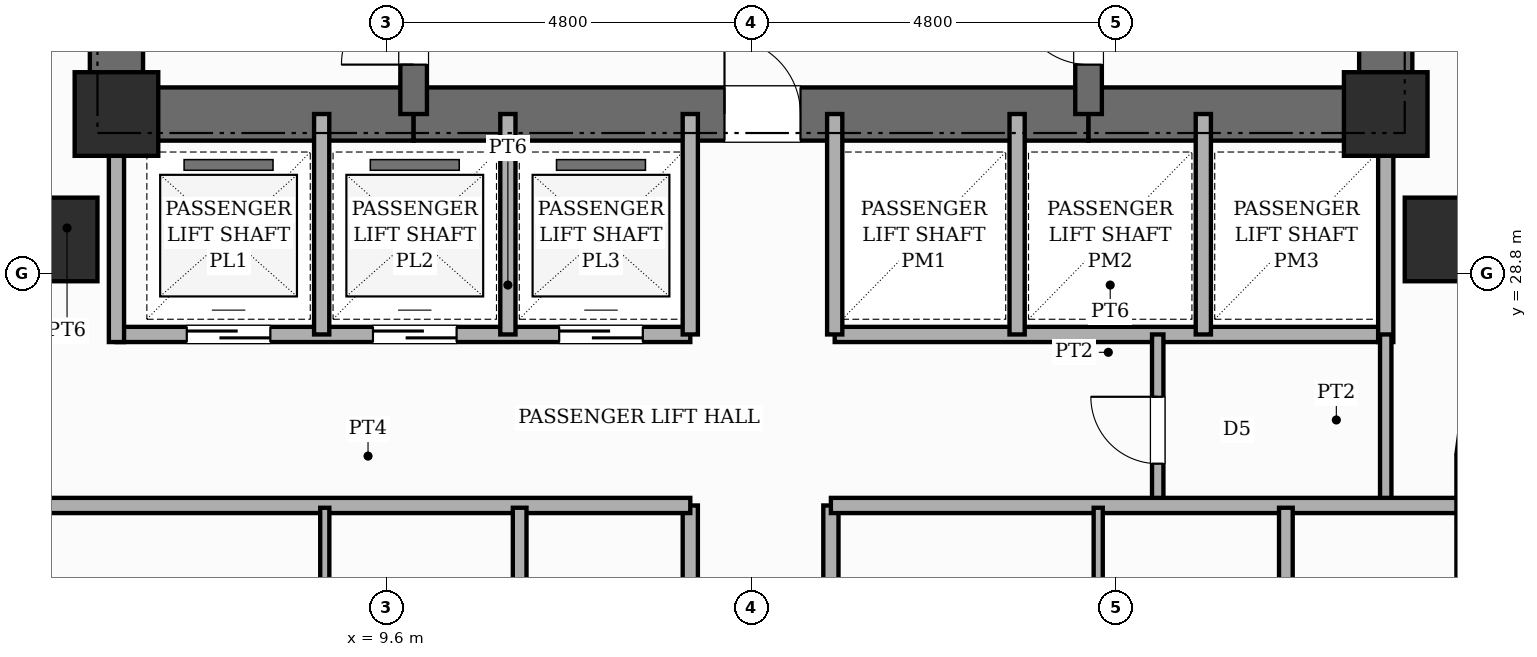
"""IFC4 building model, lengths in metres.
Left out: names, types, materials, properties, quantities, classifications, styles, units other than length and angle.
Written with IfcOpenShell. Run it as: python <this file> out.ifc"""

import sys

from ifc_helpers import new_model, si_unit, direction, frame, frame_2d, origin, origin_2d, place, context, subcontext, project, spatial, rectangle, extrude, element, fill, save


model = new_model("IFC4")
c1 = context("Model", 3, precision=1e-05, world=origin(), true_north=direction((0.0, 1.0)))
c2 = subcontext(c1, "Body", "Model", "MODEL_VIEW")
j1 = project(units=[si_unit("LENGTHUNIT", "METRE"), si_unit("PLANEANGLEUNIT", "RADIAN")], contexts=[c1])
p1 = place(None, origin())
s1 = spatial("IfcSite", under=j1, at=p1, CompositionType="ELEMENT")
p2 = place(p1, origin())
s2 = spatial("IfcBuilding", under=s1, at=p2, CompositionType="ELEMENT")
p3 = place(p2, frame((0.0, 0.0, 28.6)))
s3 = spatial("IfcBuildingStorey", under=s2, at=p3, CompositionType="ELEMENT", Elevation=28.6)
p4 = place(p3, frame((6.05, 30.55, 0.0), z_axis=(0.0, 0.0, 1.0), x_axis=(0.0, 1.0, 0.0)))
e1 = element("IfcWall", 1, at=p4, inside=s3, PredefinedType="SHEAR", context=c2, shape_type="SweptSolid", body=[
    extrude(rectangle(XDim=15.6, YDim=0.7, at=frame_2d((7.8, 0.0))), origin(), (0.0, 0.0, 1.0), 3.6),
])
p5 = place(p3, frame((22.75, 30.55, 0.0), z_axis=(0.0, 0.0, 1.0), x_axis=(0.0, 1.0, 0.0)))
e2 = element("IfcWall", 2, at=p5, inside=s3, PredefinedType="SHEAR", context=c2, shape_type="SweptSolid", body=[
    extrude(rectangle(XDim=15.6, YDim=0.7, at=frame_2d((7.8, 0.0))), origin(), (0.0, 0.0, 1.0), 3.6),
])
p6 = place(p5, frame((10.8, 0.0, 0.0)))
e3 = element("IfcOpeningElement", 3, at=p6, cuts=e2, PredefinedType="OPENING", context=c2, shape_type="SweptSolid", body=[
    extrude(rectangle(XDim=1.0, YDim=2.15, at=frame_2d((0.5, 1.075))), frame((0.0, 0.36, 0.0), z_axis=(0.0, -1.0, 0.0), x_axis=(1.0, 0.0, 0.0)), (0.0, 0.0, 1.0), 0.72),
])
p7 = place(p3, frame((6.05, 30.9, 0.0), z_axis=(0.0, 0.0, 1.0), x_axis=(1.0, 0.0, 0.0)))
e4 = element("IfcWall", 4, at=p7, inside=s3, PredefinedType="SHEAR", context=c2, shape_type="SweptSolid", body=[
    extrude(rectangle(XDim=3.91, YDim=0.7, at=frame_2d((1.955, 0.0))), origin(), (0.0, 0.0, 1.0), 3.6),
])
p8 = place(p3, frame((9.96, 30.9, 0.0), z_axis=(0.0, 0.0, 1.0), x_axis=(1.0, 0.0, 0.0)))
e5 = element("IfcWall", 5, at=p8, inside=s3, PredefinedType="SHEAR", context=c2, shape_type="SweptSolid", body=[
    extrude(rectangle(XDim=8.88, YDim=0.7, at=frame_2d((4.44, 0.0))), origin(), (0.0, 0.0, 1.0), 3.6),
])
p9 = place(p8, frame((4.09, 0.0, 0.0)))
e6 = element("IfcOpeningElement", 6, at=p9, cuts=e5, PredefinedType="OPENING", context=c2, shape_type="SweptSolid", body=[
    extrude(rectangle(XDim=1.0, YDim=2.15, at=frame_2d((0.5, 1.075))), frame((0.0, 0.36, 0.0), z_axis=(0.0, -1.0, 0.0), x_axis=(1.0, 0.0, 0.0)), (0.0, 0.0, 1.0), 0.72),
])
p10 = place(p3, frame((18.84, 30.9, 0.0), z_axis=(0.0, 0.0, 1.0), x_axis=(1.0, 0.0, 0.0)))
e7 = element("IfcWall", 7, at=p10, inside=s3, PredefinedType="SHEAR", context=c2, shape_type="SweptSolid", body=[
    extrude(rectangle(XDim=3.91, YDim=0.7, at=frame_2d((1.955, 0.0))), origin(), (0.0, 0.0, 1.0), 3.6),
])
p11 = place(p3, frame((9.96, 30.9, 0.0), z_axis=(0.0, 0.0, 1.0), x_axis=(0.0, 1.0, 0.0)))
e8 = element("IfcWall", 8, at=p11, inside=s3, PredefinedType="SHEAR", context=c2, shape_type="SweptSolid", body=[
    extrude(rectangle(XDim=14.9, YDim=0.35, at=frame_2d((7.45, 0.0))), origin(), (0.0, 0.0, 1.0), 3.6),
])
p12 = place(p11, frame((0.65, 0.0, 0.0)))
e9 = element("IfcOpeningElement", 9, at=p12, cuts=e8, PredefinedType="OPENING", context=c2, shape_type="SweptSolid", body=[
    extrude(rectangle(XDim=0.95, YDim=2.1, at=frame_2d((0.475, 1.05))), frame((0.0, 0.185, 0.0), z_axis=(0.0, -1.0, 0.0), x_axis=(1.0, 0.0, 0.0)), (0.0, 0.0, 1.0), 0.37),
])
p13 = place(p11, frame((10.45, 0.0, 0.0)))
e10 = element("IfcOpeningElement", 10, at=p13, cuts=e8, PredefinedType="OPENING", context=c2, shape_type="SweptSolid", body=[
    extrude(rectangle(XDim=1.0, YDim=2.15, at=frame_2d((0.5, 1.075))), frame((0.0, 0.185, 0.0), z_axis=(0.0, -1.0, 0.0), x_axis=(1.0, 0.0, 0.0)), (0.0, 0.0, 1.0), 0.37),
])
p14 = place(p3, frame((18.84, 30.9, 0.0), z_axis=(0.0, 0.0, 1.0), x_axis=(0.0, 1.0, 0.0)))
e11 = element("IfcWall", 11, at=p14, inside=s3, PredefinedType="SHEAR", context=c2, shape_type="SweptSolid", body=[
    extrude(rectangle(XDim=14.9, YDim=0.35, at=frame_2d((7.45, 0.0))), origin(), (0.0, 0.0, 1.0), 3.6),
])
p15 = place(p14, frame((0.65, 0.0, 0.0)))
e12 = element("IfcOpeningElement", 12, at=p15, cuts=e11, PredefinedType="OPENING", context=c2, shape_type="SweptSolid", body=[
    extrude(rectangle(XDim=0.95, YDim=2.1, at=frame_2d((0.475, 1.05))), frame((0.0, 0.185, 0.0), z_axis=(0.0, -1.0, 0.0), x_axis=(1.0, 0.0, 0.0)), (0.0, 0.0, 1.0), 0.37),
])
p16 = place(p14, frame((10.45, 0.0, 0.0)))
e13 = element("IfcOpeningElement", 13, at=p16, cuts=e11, PredefinedType="OPENING", context=c2, shape_type="SweptSolid", body=[
    extrude(rectangle(XDim=1.0, YDim=2.15, at=frame_2d((0.5, 1.075))), frame((0.0, 0.185, 0.0), z_axis=(0.0, -1.0, 0.0), x_axis=(1.0, 0.0, 0.0)), (0.0, 0.0, 1.0), 0.37),
])
for number, where, z_axis, x_axis in (
    (14, (5.25, 29.25, 0.0), (0.0, 0.0, 1.0), (1.0, 0.0, 0.0)),
    (15, (6.05, 30.9, 0.0), (0.0, 0.0, 1.0), (1.0, 0.0, 0.0)),
    (16, (22.75, 30.9, 0.0), (0.0, 0.0, 1.0), (1.0, 0.0, 0.0)),
    (17, (23.55, 29.25, 0.0), (0.0, 0.0, 1.0), (1.0, 0.0, 0.0)),
):
    element("IfcColumn", number, at=place(p3, frame(where, z_axis=z_axis, x_axis=x_axis)), inside=s3, PredefinedType="COLUMN", context=c2, shape_type="SweptSolid", body=[
        extrude(rectangle(XDim=1.1, YDim=1.1, at=origin_2d()), origin(), (0.0, 0.0, 1.0), 3.6),
    ])
p17 = place(p3, frame((23.923, 27.042, 0.0), z_axis=(0.0, 0.0, 1.0), x_axis=(-0.130555323746, -0.9914410257, 0.0)))
e18 = element("IfcWall", 18, at=p17, inside=s3, PredefinedType="STANDARD", context=c2, shape_type="SweptSolid", body=[
    extrude(rectangle(XDim=0.626, YDim=0.32, at=frame_2d((0.313, 0.0))), origin(), (0.0, 0.0, 1.0), 2.53),
])
p18 = place(p3, frame((23.84, 26.4, 0.0), z_axis=(0.0, 0.0, 1.0), x_axis=(0.0, -1.0, 0.0)))
e19 = element("IfcWall", 19, at=p18, inside=s3, PredefinedType="STANDARD", context=c2, shape_type="SweptSolid", body=[
    extrude(rectangle(XDim=19.2, YDim=0.32, at=frame_2d((9.6, 0.0))), origin(), (0.0, 0.0, 1.0), 2.53),
])
p19 = place(p18, frame((15.04, 0.0, 0.45)))
e20 = element("IfcOpeningElement", 20, at=p19, cuts=e19, PredefinedType="OPENING", context=c2, shape_type="SweptSolid", body=[
    extrude(rectangle(XDim=0.95, YDim=1.8, at=frame_2d((0.475, 0.9))), frame((0.0, 0.17, 0.0), z_axis=(0.0, -1.0, 0.0), x_axis=(1.0, 0.0, 0.0)), (0.0, 0.0, 1.0), 0.34),
])
p20 = place(p18, frame((8.22, 0.0, 0.65)))
e21 = element("IfcOpeningElement", 21, at=p20, cuts=e19, PredefinedType="OPENING", context=c2, shape_type="SweptSolid", body=[
    extrude(rectangle(XDim=1.4, YDim=1.1, at=frame_2d((0.7, 0.55))), frame((0.0, 0.17, 0.0), z_axis=(0.0, -1.0, 0.0), x_axis=(1.0, 0.0, 0.0)), (0.0, 0.0, 1.0), 0.34),
])
p21 = place(p18, frame((4.795, 0.0, 0.65)))
e22 = element("IfcOpeningElement", 22, at=p21, cuts=e19, PredefinedType="OPENING", context=c2, shape_type="SweptSolid", body=[
    extrude(rectangle(XDim=1.4, YDim=1.1, at=frame_2d((0.7, 0.55))), frame((0.0, 0.17, 0.0), z_axis=(0.0, -1.0, 0.0), x_axis=(1.0, 0.0, 0.0)), (0.0, 0.0, 1.0), 0.34),
])
p22 = place(p18, frame((10.26, 0.0, 0.45)))
e23 = element("IfcOpeningElement", 23, at=p22, cuts=e19, PredefinedType="OPENING", context=c2, shape_type="SweptSolid", body=[
    extrude(rectangle(XDim=0.95, YDim=1.8, at=frame_2d((0.475, 0.9))), frame((0.0, 0.17, 0.0), z_axis=(0.0, -1.0, 0.0), x_axis=(1.0, 0.0, 0.0)), (0.0, 0.0, 1.0), 0.34),
])
p23 = place(p18, frame((0.88, 0.0, 0.45)))
e24 = element("IfcOpeningElement", 24, at=p23, cuts=e19, PredefinedType="OPENING", context=c2, shape_type="SweptSolid", body=[
    extrude(rectangle(XDim=0.75, YDim=1.8, at=frame_2d((0.375, 0.9))), frame((0.0, 0.17, 0.0), z_axis=(0.0, -1.0, 0.0), x_axis=(1.0, 0.0, 0.0)), (0.0, 0.0, 1.0), 0.34),
])
p24 = place(p3, frame((6.05, 28.0, 0.0), z_axis=(0.0, 0.0, 1.0), x_axis=(1.0, 0.0, 0.0)))
e25 = element("IfcWall", 25, at=p24, inside=s3, PredefinedType="POLYGONAL", context=c2, shape_type="SweptSolid", body=[
    extrude(rectangle(XDim=7.55, YDim=0.2, at=frame_2d((3.775, 0.0))), origin(), (0.0, 0.0, 1.0), 3.35),
])
p25 = place(p24, frame((0.925, 0.0, 0.0)))
e26 = element("IfcOpeningElement", 26, at=p25, cuts=e25, PredefinedType="OPENING", context=c2, shape_type="SweptSolid", body=[
    extrude(rectangle(XDim=1.1, YDim=2.15, at=frame_2d((0.55, 1.075))), frame((0.0, 0.11, 0.0), z_axis=(0.0, -1.0, 0.0), x_axis=(1.0, 0.0, 0.0)), (0.0, 0.0, 1.0), 0.22),
])
p26 = place(p24, frame((3.375, 0.0, 0.0)))
e27 = element("IfcOpeningElement", 27, at=p26, cuts=e25, PredefinedType="OPENING", context=c2, shape_type="SweptSolid", body=[
    extrude(rectangle(XDim=1.1, YDim=2.15, at=frame_2d((0.55, 1.075))), frame((0.0, 0.11, 0.0), z_axis=(0.0, -1.0, 0.0), x_axis=(1.0, 0.0, 0.0)), (0.0, 0.0, 1.0), 0.22),
])
p27 = place(p24, frame((5.825, 0.0, 0.0)))
e28 = element("IfcOpeningElement", 28, at=p27, cuts=e25, PredefinedType="OPENING", context=c2, shape_type="SweptSolid", body=[
    extrude(rectangle(XDim=1.1, YDim=2.15, at=frame_2d((0.55, 1.075))), frame((0.0, 0.11, 0.0), z_axis=(0.0, -1.0, 0.0), x_axis=(1.0, 0.0, 0.0)), (0.0, 0.0, 1.0), 0.22),
])
p28 = place(p3, frame((15.5, 28.0, 0.0), z_axis=(0.0, 0.0, 1.0), x_axis=(1.0, 0.0, 0.0)))
e29 = element("IfcWall", 29, at=p28, inside=s3, PredefinedType="POLYGONAL", context=c2, shape_type="SweptSolid", body=[
    extrude(rectangle(XDim=7.25, YDim=0.2, at=frame_2d((3.625, 0.0))), origin(), (0.0, 0.0, 1.0), 3.35),
])
for number, where, z_axis, x_axis in (
    (30, (6.05, 27.9, 0.0), (0.0, 0.0, 1.0), (0.0, 1.0, 0.0)),
    (31, (22.75, 27.9, 0.0), (0.0, 0.0, 1.0), (0.0, 1.0, 0.0)),
):
    element("IfcWall", number, at=place(p3, frame(where, z_axis=z_axis, x_axis=x_axis)), inside=s3, PredefinedType="POLYGONAL", context=c2, shape_type="SweptSolid", body=[
        extrude(rectangle(XDim=3.0, YDim=0.2, at=frame_2d((1.5, 0.0))), origin(), (0.0, 0.0, 1.0), 3.35),
    ])
for number, where, z_axis, x_axis in (
    (32, (13.6, 28.0, 0.0), (0.0, 0.0, 1.0), (0.0, 1.0, 0.0)),
    (33, (15.5, 28.0, 0.0), (0.0, 0.0, 1.0), (0.0, 1.0, 0.0)),
    (34, (8.75, 28.0, 0.0), (0.0, 0.0, 1.0), (0.0, 1.0, 0.0)),
    (35, (11.2, 28.0, 0.0), (0.0, 0.0, 1.0), (0.0, 1.0, 0.0)),
    (36, (17.9, 28.0, 0.0), (0.0, 0.0, 1.0), (0.0, 1.0, 0.0)),
    (37, (20.35, 28.0, 0.0), (0.0, 0.0, 1.0), (0.0, 1.0, 0.0)),
):
    element("IfcWall", number, at=place(p3, frame(where, z_axis=z_axis, x_axis=x_axis)), inside=s3, PredefinedType="POLYGONAL", context=c2, shape_type="SweptSolid", body=[
        extrude(rectangle(XDim=2.9, YDim=0.2, at=frame_2d((1.45, 0.0))), origin(), (0.0, 0.0, 1.0), 3.35),
    ])
p29 = place(p3, frame((19.75, 25.75, 0.0), z_axis=(0.0, 0.0, 1.0), x_axis=(0.0, 1.0, 0.0)))
e38 = element("IfcWall", 38, at=p29, inside=s3, PredefinedType="PARTITIONING", context=c2, shape_type="SweptSolid", body=[
    extrude(rectangle(XDim=2.25, YDim=0.15, at=frame_2d((1.125, 0.0))), origin(), (0.0, 0.0, 1.0), 3.35),
])
p30 = place(p29, frame((0.55, 0.0, 0.0)))
e39 = element("IfcOpeningElement", 39, at=p30, cuts=e38, PredefinedType="OPENING", context=c2, shape_type="SweptSolid", body=[
    extrude(rectangle(XDim=0.88, YDim=2.1, at=frame_2d((0.44, 1.05))), frame((0.0, 0.085, 0.0), z_axis=(0.0, -1.0, 0.0), x_axis=(1.0, 0.0, 0.0)), (0.0, 0.0, 1.0), 0.17),
])
p31 = place(p3, frame((22.75, 25.75, 0.0), z_axis=(0.0, 0.0, 1.0), x_axis=(0.0, 1.0, 0.0)))
e40 = element("IfcWall", 40, at=p31, inside=s3, PredefinedType="PARTITIONING", context=c2, shape_type="SweptSolid", body=[
    extrude(rectangle(XDim=2.25, YDim=0.15, at=frame_2d((1.125, 0.0))), origin(), (0.0, 0.0, 1.0), 3.35),
])
p32 = place(p3, frame((13.6, 5.12, 0.0), z_axis=(0.0, 0.0, 1.0), x_axis=(0.0, 1.0, 0.0)))
e41 = element("IfcWall", 41, at=p32, inside=s3, PredefinedType="PARTITIONING", context=c2, shape_type="SweptSolid", body=[
    extrude(rectangle(XDim=20.63, YDim=0.2, at=frame_2d((10.315, 0.0))), origin(), (0.0, 0.0, 1.0), 3.35),
])
p33 = place(p32, frame((1.025, 0.0, 0.0)))
e42 = element("IfcOpeningElement", 42, at=p33, cuts=e41, PredefinedType="OPENING", context=c2, shape_type="SweptSolid", body=[
    extrude(rectangle(XDim=0.98, YDim=2.18, at=frame_2d((0.49, 1.09))), frame((0.0, 0.11, 0.0), z_axis=(0.0, -1.0, 0.0), x_axis=(1.0, 0.0, 0.0)), (0.0, 0.0, 1.0), 0.22),
])
p34 = place(p32, frame((8.39, 0.0, 0.0)))
e43 = element("IfcOpeningElement", 43, at=p34, cuts=e41, PredefinedType="OPENING", context=c2, shape_type="SweptSolid", body=[
    extrude(rectangle(XDim=0.98, YDim=2.18, at=frame_2d((0.49, 1.09))), frame((0.0, 0.11, 0.0), z_axis=(0.0, -1.0, 0.0), x_axis=(1.0, 0.0, 0.0)), (0.0, 0.0, 1.0), 0.22),
])
p35 = place(p32, frame((14.71, 0.0, 0.0)))
e44 = element("IfcOpeningElement", 44, at=p35, cuts=e41, PredefinedType="OPENING", context=c2, shape_type="SweptSolid", body=[
    extrude(rectangle(XDim=0.98, YDim=2.18, at=frame_2d((0.49, 1.09))), frame((0.0, 0.11, 0.0), z_axis=(0.0, -1.0, 0.0), x_axis=(1.0, 0.0, 0.0)), (0.0, 0.0, 1.0), 0.22),
])
p36 = place(p3, frame((15.45, 5.12, 0.0), z_axis=(0.0, 0.0, 1.0), x_axis=(0.0, 1.0, 0.0)))
e45 = element("IfcWall", 45, at=p36, inside=s3, PredefinedType="PARTITIONING", context=c2, shape_type="SweptSolid", body=[
    extrude(rectangle(XDim=20.63, YDim=0.2, at=frame_2d((10.315, 0.0))), origin(), (0.0, 0.0, 1.0), 3.35),
])
p37 = place(p36, frame((1.025, 0.0, 0.0)))
e46 = element("IfcOpeningElement", 46, at=p37, cuts=e45, PredefinedType="OPENING", context=c2, shape_type="SweptSolid", body=[
    extrude(rectangle(XDim=0.98, YDim=2.18, at=frame_2d((0.49, 1.09))), frame((0.0, 0.11, 0.0), z_axis=(0.0, -1.0, 0.0), x_axis=(1.0, 0.0, 0.0)), (0.0, 0.0, 1.0), 0.22),
])
p38 = place(p36, frame((8.39, 0.0, 0.0)))
e47 = element("IfcOpeningElement", 47, at=p38, cuts=e45, PredefinedType="OPENING", context=c2, shape_type="SweptSolid", body=[
    extrude(rectangle(XDim=0.98, YDim=2.18, at=frame_2d((0.49, 1.09))), frame((0.0, 0.11, 0.0), z_axis=(0.0, -1.0, 0.0), x_axis=(1.0, 0.0, 0.0)), (0.0, 0.0, 1.0), 0.22),
])
p39 = place(p36, frame((14.71, 0.0, 0.0)))
e48 = element("IfcOpeningElement", 48, at=p39, cuts=e45, PredefinedType="OPENING", context=c2, shape_type="SweptSolid", body=[
    extrude(rectangle(XDim=0.98, YDim=2.18, at=frame_2d((0.49, 1.09))), frame((0.0, 0.11, 0.0), z_axis=(0.0, -1.0, 0.0), x_axis=(1.0, 0.0, 0.0)), (0.0, 0.0, 1.0), 0.22),
])
p40 = place(p3, frame((5.12, 25.75, 0.0), z_axis=(0.0, 0.0, 1.0), x_axis=(1.0, 0.0, 0.0)))
e49 = element("IfcWall", 49, at=p40, inside=s3, PredefinedType="PARTITIONING", context=c2, shape_type="SweptSolid", body=[
    extrude(rectangle(XDim=8.48, YDim=0.2, at=frame_2d((4.24, 0.0))), origin(), (0.0, 0.0, 1.0), 3.35),
])
p41 = place(p3, frame((15.45, 25.75, 0.0), z_axis=(0.0, 0.0, 1.0), x_axis=(1.0, 0.0, 0.0)))
e50 = element("IfcWall", 50, at=p41, inside=s3, PredefinedType="PARTITIONING", context=c2, shape_type="SweptSolid", body=[
    extrude(rectangle(XDim=8.23, YDim=0.2, at=frame_2d((4.115, 0.0))), origin(), (0.0, 0.0, 1.0), 3.35),
])
p42 = place(p3, frame((8.791, 22.0, 0.0), z_axis=(0.0, 0.0, 1.0), x_axis=(0.0, 1.0, 0.0)))
e51 = element("IfcWall", 51, at=p42, inside=s3, PredefinedType="PARTITIONING", context=c2, shape_type="SweptSolid", body=[
    extrude(rectangle(XDim=3.72, YDim=0.12, at=frame_2d((1.86, 0.0))), origin(), (0.0, 0.0, 1.0), 3.35),
])
p43 = place(p3, frame((11.355, 22.0, 0.0), z_axis=(0.0, 0.0, 1.0), x_axis=(0.0, 1.0, 0.0)))
e52 = element("IfcWall", 52, at=p43, inside=s3, PredefinedType="PLUMBINGWALL", context=c2, shape_type="SweptSolid", body=[
    extrude(rectangle(XDim=3.72, YDim=0.18, at=frame_2d((1.86, 0.0))), origin(), (0.0, 0.0, 1.0), 3.35),
])
p44 = place(p3, frame((18.967, 22.04, 0.0), z_axis=(0.0, 0.0, 1.0), x_axis=(0.0, 1.0, 0.0)))
e53 = element("IfcWall", 53, at=p44, inside=s3, PredefinedType="PARTITIONING", context=c2, shape_type="SweptSolid", body=[
    extrude(rectangle(XDim=3.68, YDim=0.12, at=frame_2d((1.84, 0.0))), origin(), (0.0, 0.0, 1.0), 3.35),
])
p45 = place(p3, frame((21.436, 22.04, 0.0), z_axis=(0.0, 0.0, 1.0), x_axis=(0.0, 1.0, 0.0)))
e54 = element("IfcWall", 54, at=p45, inside=s3, PredefinedType="PLUMBINGWALL", context=c2, shape_type="SweptSolid", body=[
    extrude(rectangle(XDim=3.68, YDim=0.18, at=frame_2d((1.84, 0.0))), origin(), (0.0, 0.0, 1.0), 3.35),
])
p46 = place(p12, origin())
e55 = element("IfcDoor", 55, at=p46, inside=s3, OperationType="SINGLE_SWING_LEFT", PredefinedType="DOOR", context=c2, shape_type="SweptSolid", body=[
    extrude(rectangle(XDim=0.95, YDim=2.1, at=frame_2d((0.475, 1.05))), frame((0.0, 0.025, 0.0), z_axis=(0.0, -1.0, 0.0), x_axis=(1.0, 0.0, 0.0)), (0.0, 0.0, 1.0), 0.05),
])
fill(e9, e55)
p47 = place(p15, origin())
e56 = element("IfcDoor", 56, at=p47, inside=s3, OperationType="SINGLE_SWING_RIGHT", PredefinedType="DOOR", context=c2, shape_type="SweptSolid", body=[
    extrude(rectangle(XDim=0.95, YDim=2.1, at=frame_2d((0.475, 1.05))), frame((0.0, 0.025, 0.0), z_axis=(0.0, -1.0, 0.0), x_axis=(1.0, 0.0, 0.0)), (0.0, 0.0, 1.0), 0.05),
])
fill(e12, e56)
p48 = place(p9, origin())
e57 = element("IfcDoor", 57, at=p48, inside=s3, OperationType="SINGLE_SWING_LEFT", PredefinedType="DOOR", context=c2, shape_type="SweptSolid", body=[
    extrude(rectangle(XDim=1.0, YDim=2.15, at=frame_2d((0.5, 1.075))), frame((0.0, 0.025, 0.0), z_axis=(0.0, -1.0, 0.0), x_axis=(1.0, 0.0, 0.0)), (0.0, 0.0, 1.0), 0.05),
])
fill(e6, e57)
p49 = place(p25, origin())
e58 = element("IfcDoor", 58, at=p49, inside=s3, OperationType="SLIDING_TO_LEFT", PredefinedType="DOOR", context=c2, shape_type="SweptSolid", body=[
    extrude(rectangle(XDim=1.1, YDim=2.15, at=frame_2d((0.55, 1.075))), frame((0.0, 0.025, 0.0), z_axis=(0.0, -1.0, 0.0), x_axis=(1.0, 0.0, 0.0)), (0.0, 0.0, 1.0), 0.05),
])
fill(e26, e58)
p50 = place(p26, origin())
e59 = element("IfcDoor", 59, at=p50, inside=s3, OperationType="SLIDING_TO_RIGHT", PredefinedType="DOOR", context=c2, shape_type="SweptSolid", body=[
    extrude(rectangle(XDim=1.1, YDim=2.15, at=frame_2d((0.55, 1.075))), frame((0.0, 0.025, 0.0), z_axis=(0.0, -1.0, 0.0), x_axis=(1.0, 0.0, 0.0)), (0.0, 0.0, 1.0), 0.05),
])
fill(e27, e59)
p51 = place(p27, origin())
e60 = element("IfcDoor", 60, at=p51, inside=s3, OperationType="SLIDING_TO_LEFT", PredefinedType="DOOR", context=c2, shape_type="SweptSolid", body=[
    extrude(rectangle(XDim=1.1, YDim=2.15, at=frame_2d((0.55, 1.075))), frame((0.0, 0.025, 0.0), z_axis=(0.0, -1.0, 0.0), x_axis=(1.0, 0.0, 0.0)), (0.0, 0.0, 1.0), 0.05),
])
fill(e28, e60)
p52 = place(p30, origin())
e61 = element("IfcDoor", 61, at=p52, inside=s3, OperationType="SINGLE_SWING_RIGHT", PredefinedType="DOOR", context=c2, shape_type="SweptSolid", body=[
    extrude(rectangle(XDim=0.88, YDim=2.1, at=frame_2d((0.44, 1.05))), frame((0.0, 0.025, 0.0), z_axis=(0.0, -1.0, 0.0), x_axis=(1.0, 0.0, 0.0)), (0.0, 0.0, 1.0), 0.05),
])
fill(e39, e61)
save(model, sys.argv[1])
